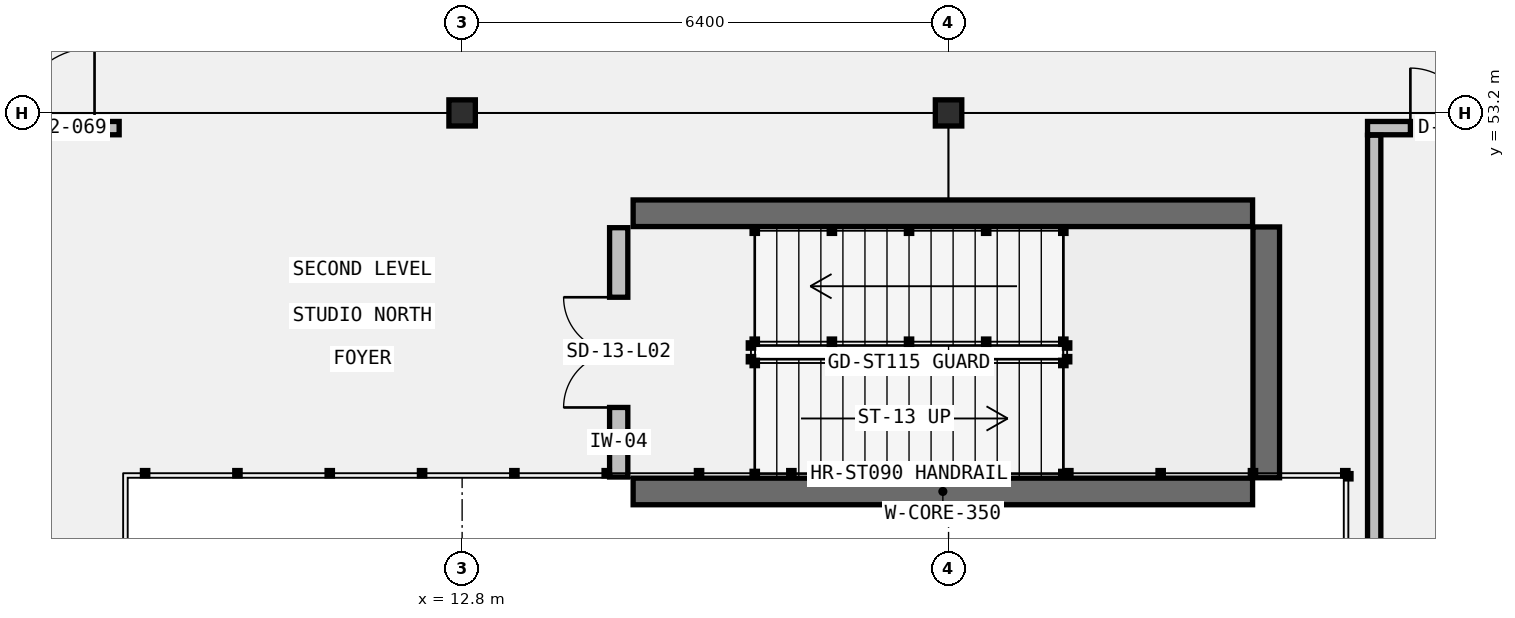
"""IFC4 building model, lengths in metres.
Left out: names, types, materials, properties, quantities, classifications, styles, units other than length and angle.
Written with IfcOpenShell. Run it as: python <this file> out.ifc"""

import sys

from ifc_helpers import new_model, si_unit, direction, frame, frame_2d, origin, origin_2d, place, context, subcontext, project, spatial, rectangle, i_section, extrude, element, fill, save


model = new_model("IFC4")
c1 = context("Model", 3, precision=1e-05, world=origin(), true_north=direction((0.0, 1.0)))
c2 = subcontext(c1, "Body", "Model", "MODEL_VIEW")
j1 = project(units=[si_unit("LENGTHUNIT", "METRE"), si_unit("PLANEANGLEUNIT", "RADIAN")], contexts=[c1])
p1 = place(None, origin())
s1 = spatial("IfcSite", under=j1, at=p1, CompositionType="ELEMENT")
p2 = place(p1, origin())
s2 = spatial("IfcBuilding", under=s1, at=p2, CompositionType="ELEMENT")
p3 = place(p2, frame((0.0, 0.0, 10.0)))
s3 = spatial("IfcBuildingStorey", under=s2, at=p3, CompositionType="ELEMENT", Elevation=10.0)
for number, where, z_axis, x_axis in (
    (1, (12.8, 53.2, 0.0), (0.0, 0.0, 1.0), (1.0, 0.0, 0.0)),
    (2, (19.2, 53.2, 0.0), (0.0, 0.0, 1.0), (1.0, 0.0, 0.0)),
):
    element("IfcColumn", number, at=place(p3, frame(where, z_axis=z_axis, x_axis=x_axis)), inside=s3, PredefinedType="COLUMN", context=c2, shape_type="SweptSolid", body=[
        extrude(i_section(OverallWidth=0.348, OverallDepth=0.344, WebThickness=0.01, FlangeThickness=0.016, FilletRadius=0.018, at=origin_2d()), origin(), (0.0, 0.0, 1.0), 4.6),
    ])
p4 = place(p3, frame((15.05, 48.22, 0.0), z_axis=(0.0, 0.0, 1.0), x_axis=(1.0, 0.0, 0.0)))
e3 = element("IfcWall", 3, at=p4, inside=s3, PredefinedType="SHEAR", context=c2, shape_type="SweptSolid", body=[
    extrude(rectangle(XDim=8.15, YDim=0.35, at=frame_2d((4.075, 0.0))), origin(), (0.0, 0.0, 1.0), 4.36),
])
p5 = place(p3, frame((23.38, 48.4, 0.0), z_axis=(0.0, 0.0, 1.0), x_axis=(0.0, 1.0, 0.0)))
e4 = element("IfcWall", 4, at=p5, inside=s3, PredefinedType="SHEAR", context=c2, shape_type="SweptSolid", body=[
    extrude(rectangle(XDim=3.3, YDim=0.35, at=frame_2d((1.65, 0.0))), origin(), (0.0, 0.0, 1.0), 4.36),
])
p6 = place(p3, frame((23.2, 51.88, 0.0), z_axis=(0.0, 0.0, 1.0), x_axis=(-1.0, 0.0, 0.0)))
e5 = element("IfcWall", 5, at=p6, inside=s3, PredefinedType="SHEAR", context=c2, shape_type="SweptSolid", body=[
    extrude(rectangle(XDim=8.15, YDim=0.35, at=frame_2d((4.075, 0.0))), origin(), (0.0, 0.0, 1.0), 4.36),
])
p7 = place(p3, frame((14.86, 48.41, 0.0), z_axis=(0.0, 0.0, 1.0), x_axis=(0.0, 1.0, 0.0)))
e6 = element("IfcWall", 6, at=p7, inside=s3, PredefinedType="STANDARD", context=c2, shape_type="SweptSolid", body=[
    extrude(rectangle(XDim=3.28, YDim=0.24, at=frame_2d((1.64, 0.0))), origin(), (0.0, 0.0, 1.0), 4.36),
])
p8 = place(p7, frame((0.915, 0.0, 0.0)))
e7 = element("IfcOpeningElement", 7, at=p8, cuts=e6, PredefinedType="OPENING", context=c2, shape_type="SweptSolid", body=[
    extrude(rectangle(XDim=1.45, YDim=2.2, at=frame_2d((0.725, 1.1))), frame((0.0, 0.13, 0.0), z_axis=(0.0, -1.0, 0.0), x_axis=(1.0, 0.0, 0.0)), (0.0, 0.0, 1.0), 0.26),
])
p9 = place(p3, frame((6.58, 53.0, 0.0), z_axis=(0.0, 0.0, 1.0), x_axis=(1.0, 0.0, 0.0)))
e8 = element("IfcWall", 8, at=p9, inside=s3, PredefinedType="PARTITIONING", context=c2, shape_type="SweptSolid", body=[
    extrude(rectangle(XDim=1.708, YDim=0.175, at=frame_2d((0.854, 0.0))), origin(), (0.0, 0.0, 1.0), 3.538),
])
p10 = place(p9, frame((0.324, 0.0, 0.0)))
e9 = element("IfcOpeningElement", 9, at=p10, cuts=e8, PredefinedType="OPENING", context=c2, shape_type="SweptSolid", body=[
    extrude(rectangle(XDim=1.06, YDim=2.15, at=frame_2d((0.53, 1.075))), frame((0.0, 0.097, 0.0), z_axis=(0.0, -1.0, 0.0), x_axis=(1.0, 0.0, 0.0)), (0.0, 0.0, 1.0), 0.195),
])
p11 = place(p3, frame((24.712, 53.0, 0.0), z_axis=(0.0, 0.0, 1.0), x_axis=(1.0, 0.0, 0.0)))
e10 = element("IfcWall", 10, at=p11, inside=s3, PredefinedType="PARTITIONING", context=c2, shape_type="SweptSolid", body=[
    extrude(rectangle(XDim=2.708, YDim=0.175, at=frame_2d((1.354, 0.0))), origin(), (0.0, 0.0, 1.0), 3.538),
])
p12 = place(p11, frame((0.564, 0.0, 0.0)))
e11 = element("IfcOpeningElement", 11, at=p12, cuts=e10, PredefinedType="OPENING", context=c2, shape_type="SweptSolid", body=[
    extrude(rectangle(XDim=1.58, YDim=2.28, at=frame_2d((0.79, 1.14))), frame((0.0, 0.097, 0.0), z_axis=(0.0, -1.0, 0.0), x_axis=(1.0, 0.0, 0.0)), (0.0, 0.0, 1.0), 0.195),
])
p13 = place(p3, frame((24.8, 39.894, 0.0), z_axis=(0.0, 0.0, 1.0), x_axis=(0.0, 1.0, 0.0)))
e12 = element("IfcWall", 12, at=p13, inside=s3, PredefinedType="PARTITIONING", context=c2, shape_type="SweptSolid", body=[
    extrude(rectangle(XDim=13.013, YDim=0.175, at=frame_2d((6.506, 0.0))), origin(), (0.0, 0.0, 1.0), 3.538),
])
p14 = place(p8, origin())
e13 = element("IfcDoor", 13, at=p14, inside=s3, OperationType="DOUBLE_DOOR_SINGLE_SWING", PredefinedType="DOOR", context=c2, shape_type="SweptSolid", body=[
    extrude(rectangle(XDim=1.45, YDim=2.2, at=frame_2d((0.725, 1.1))), frame((0.0, 0.025, 0.0), z_axis=(0.0, -1.0, 0.0), x_axis=(1.0, 0.0, 0.0)), (0.0, 0.0, 1.0), 0.05),
])
fill(e7, e13)
p15 = place(p10, origin())
e14 = element("IfcDoor", 14, at=p15, inside=s3, OperationType="SINGLE_SWING_RIGHT", PredefinedType="DOOR", context=c2, shape_type="SweptSolid", body=[
    extrude(rectangle(XDim=1.06, YDim=2.15, at=frame_2d((0.53, 1.075))), frame((0.0, 0.025, 0.0), z_axis=(0.0, -1.0, 0.0), x_axis=(1.0, 0.0, 0.0)), (0.0, 0.0, 1.0), 0.05),
])
fill(e9, e14)
p16 = place(p12, origin())
e15 = element("IfcDoor", 15, at=p16, inside=s3, OperationType="DOUBLE_DOOR_SINGLE_SWING", PredefinedType="DOOR", context=c2, shape_type="SweptSolid", body=[
    extrude(rectangle(XDim=1.58, YDim=2.28, at=frame_2d((0.79, 1.14))), frame((0.0, 0.025, 0.0), z_axis=(0.0, -1.0, 0.0), x_axis=(1.0, 0.0, 0.0)), (0.0, 0.0, 1.0), 0.05),
])
fill(e11, e15)
save(model, sys.argv[1])
